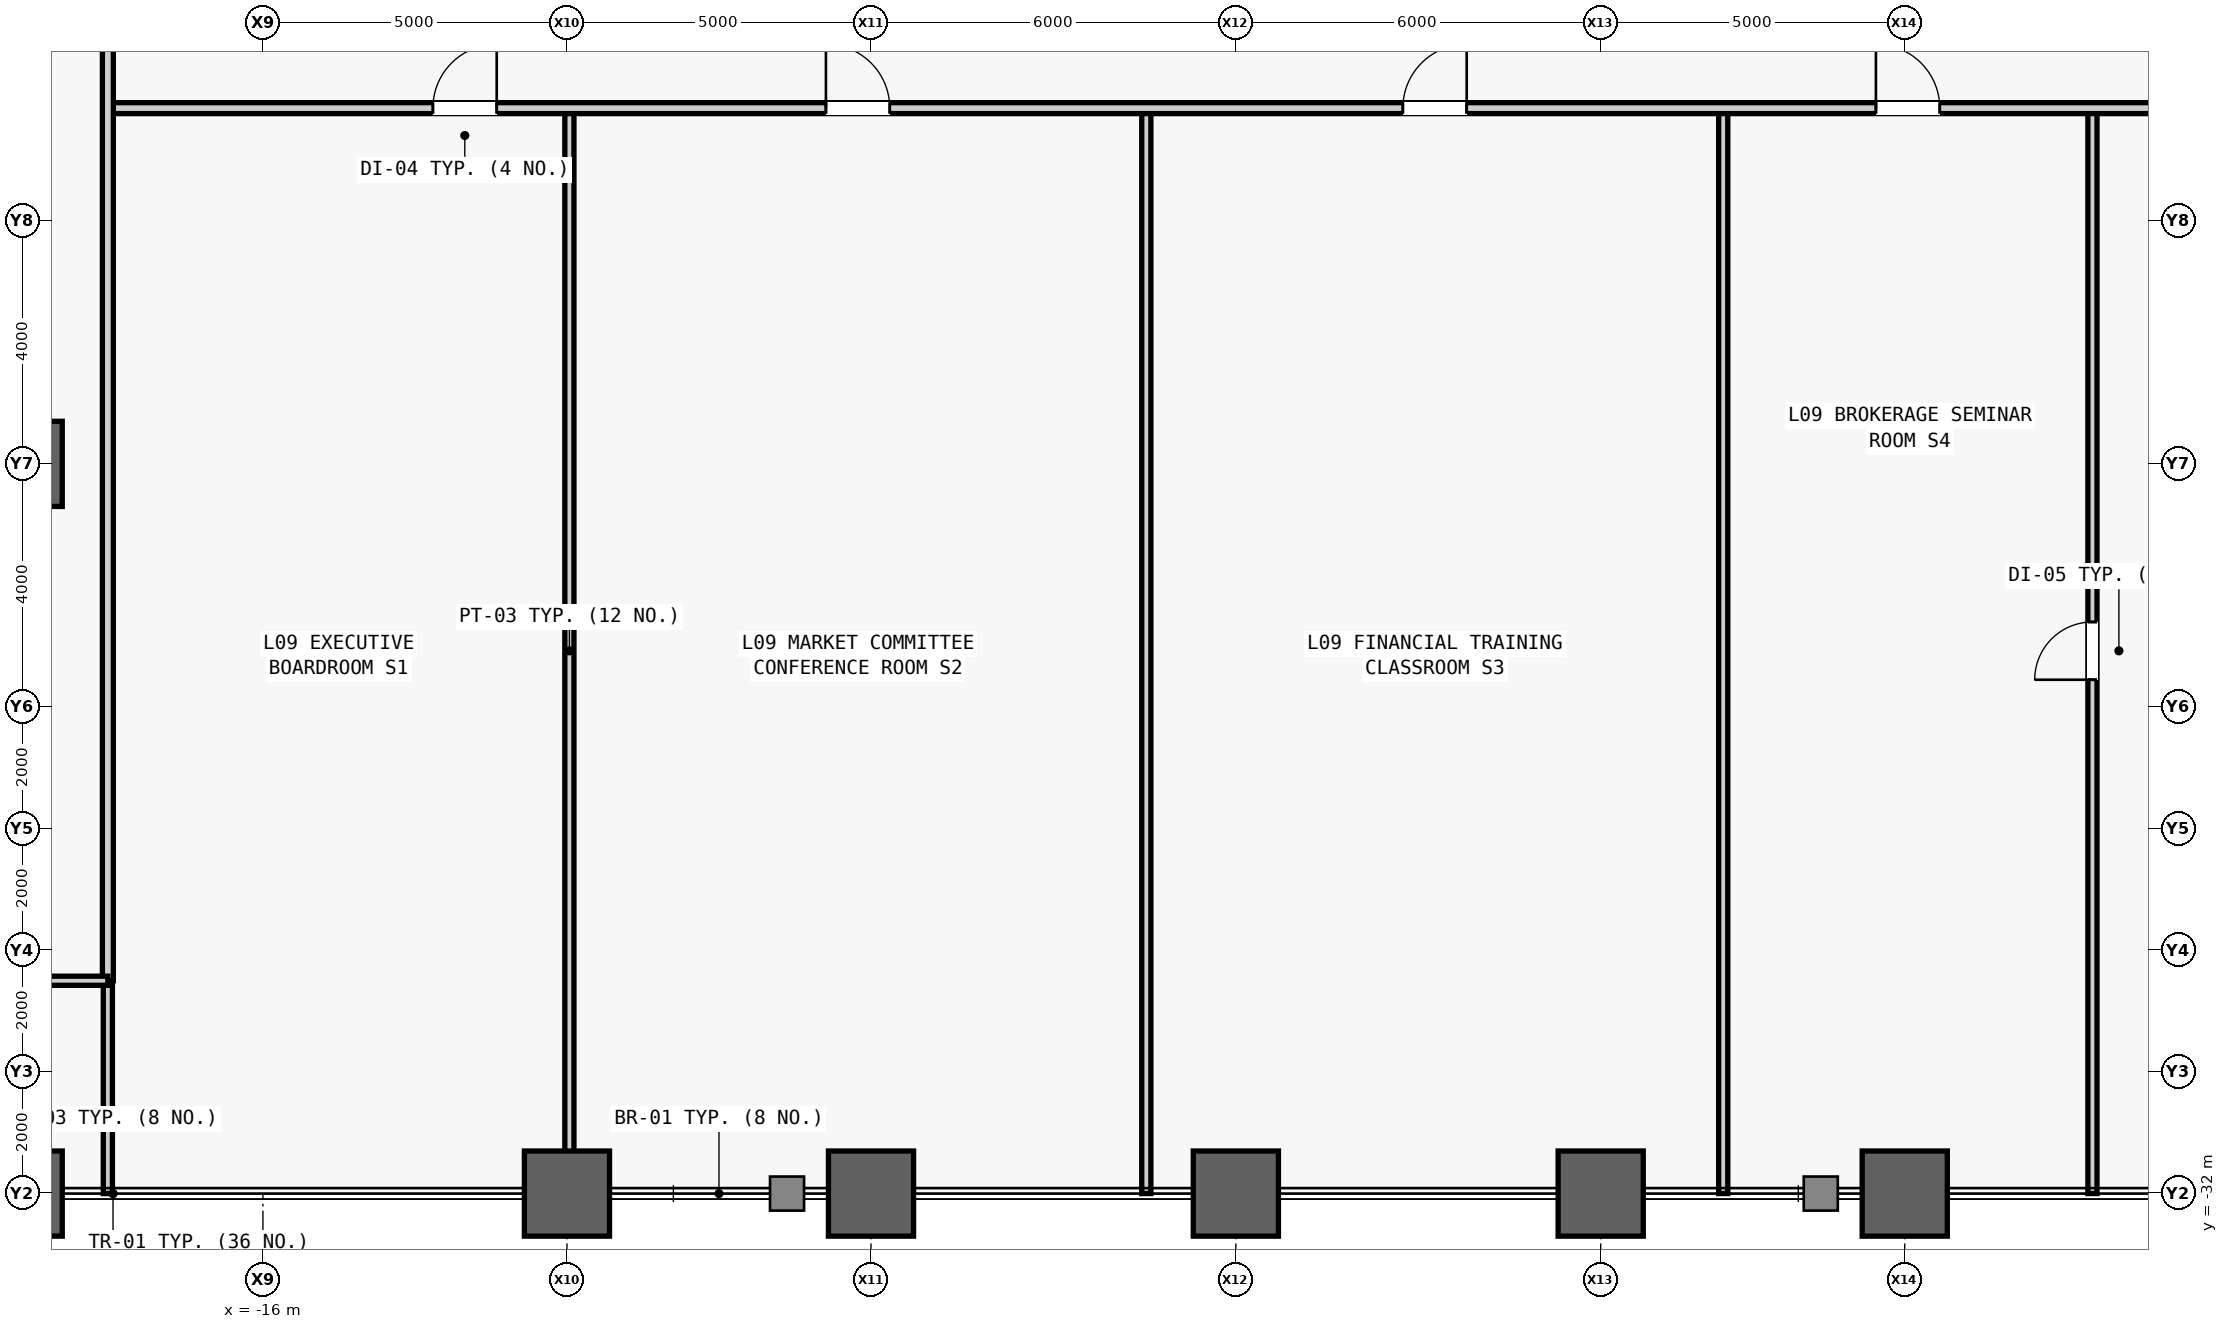
"""IFC4 building model, lengths in metres.
Left out: names, types, materials, properties, quantities, classifications, styles, units other than length and angle.
Written with IfcOpenShell. Run it as: python <this file> out.ifc"""

import sys

from ifc_helpers import new_model, si_unit, direction, frame, frame_2d, origin, origin_2d, place, context, subcontext, project, spatial, rectangle, hollow_rectangle, extrude, source, transform, mapped, element, fill, save


model = new_model("IFC4")
c1 = context("Model", 3, precision=1e-05, world=origin(), true_north=direction((0.0, 1.0)))
c2 = subcontext(c1, "Body", "Model", "MODEL_VIEW")
j1 = project(units=[si_unit("LENGTHUNIT", "METRE"), si_unit("PLANEANGLEUNIT", "RADIAN")], contexts=[c1])
p1 = place(None, origin())
s1 = spatial("IfcSite", under=j1, at=p1, CompositionType="ELEMENT")
p2 = place(p1, origin())
s2 = spatial("IfcBuilding", under=s1, at=p2, CompositionType="ELEMENT")
p3 = place(p2, frame((0.0, 0.0, 45.2)))
s3 = spatial("IfcBuildingStorey", under=s2, at=p3, CompositionType="ELEMENT", Elevation=45.2)
m1 = source(origin(), c2, "Body", "SweptSolid", [
    extrude(hollow_rectangle(XDim=1.4, YDim=1.4, WallThickness=0.075, at=origin_2d()), origin(), (0.0, 0.0, 1.0), 4.2),
])
for number, where, z_axis, x_axis in (
    (1, (-20.0, -32.0, 0.0), (0.0, 0.0, 1.0), (1.0, 0.0, 0.0)),
    (2, (-20.0, -20.0, 0.0), (0.0, 0.0, 1.0), (1.0, 0.0, 0.0)),
    (3, (-11.0, -32.0, 0.0), (0.0, 0.0, 1.0), (1.0, 0.0, 0.0)),
    (4, (-6.0, -32.0, 0.0), (0.0, 0.0, 1.0), (1.0, 0.0, 0.0)),
    (5, (0.0, -32.0, 0.0), (0.0, 0.0, 1.0), (1.0, 0.0, 0.0)),
    (6, (6.0, -32.0, 0.0), (0.0, 0.0, 1.0), (1.0, 0.0, 0.0)),
    (7, (11.0, -32.0, 0.0), (0.0, 0.0, 1.0), (1.0, 0.0, 0.0)),
):
    element("IfcColumn", number, at=place(p3, frame(where, z_axis=z_axis, x_axis=x_axis)), inside=s3, PredefinedType="COLUMN", context=c2, shape_type="MappedRepresentation", body=[
        mapped(m1, transform((0.0, 0.0, 0.0), scale=1.0)),
    ])
m2 = source(origin(), c2, "Body", "SweptSolid", [
    extrude(rectangle(XDim=17.85, YDim=0.15, at=frame_2d((8.925, 0.0))), origin(), (0.0, 0.0, 1.0), 3.085),
])
p4 = place(p3, frame((-10.96, -32.0, 0.0), z_axis=(0.0, 0.0, 1.0), x_axis=(0.0, 1.0, 0.0)))
e8 = element("IfcWall", 8, at=p4, inside=s3, PredefinedType="PARTITIONING", context=c2, shape_type="MappedRepresentation", body=[
    mapped(m2, transform((0.0, 0.0, 0.0), scale=1.0)),
])
m3 = source(origin(), c2, "Body", "SweptSolid", [
    extrude(rectangle(XDim=17.85, YDim=0.15, at=frame_2d((8.925, 0.0))), origin(), (0.0, 0.0, 1.0), 3.94),
])
for number, where, z_axis, x_axis in (
    (9, (-1.472, -32.0, 0.0), (0.0, 0.0, 1.0), (0.0, 1.0, 0.0)),
    (10, (8.015, -32.0, 0.0), (0.0, 0.0, 1.0), (0.0, 1.0, 0.0)),
):
    element("IfcWall", number, at=place(p3, frame(where, z_axis=z_axis, x_axis=x_axis)), inside=s3, PredefinedType="PARTITIONING", context=c2, shape_type="MappedRepresentation", body=[
        mapped(m3, transform((0.0, 0.0, 0.0), scale=1.0)),
    ])
p5 = place(p3, frame((14.087, -32.0, 0.0), z_axis=(0.0, 0.0, 1.0), x_axis=(0.0, 1.0, 0.0)))
e11 = element("IfcWall", 11, at=p5, inside=s3, PredefinedType="PARTITIONING", context=c2, shape_type="MappedRepresentation", body=[
    mapped(m3, transform((0.0, 0.0, 0.0), scale=1.0)),
])
m4 = source(origin(), c2, "Body", "SweptSolid", [
    extrude(rectangle(XDim=0.95, YDim=2.15, at=frame_2d((0.475, 1.075))), frame((0.0, 0.085, 0.0), z_axis=(0.0, -1.0, 0.0), x_axis=(1.0, 0.0, 0.0)), (0.0, 0.0, 1.0), 0.17),
])
p6 = place(p5, frame((8.45, 0.0, 0.0)))
e12 = element("IfcOpeningElement", 12, at=p6, cuts=e11, PredefinedType="OPENING", context=c2, shape_type="MappedRepresentation", body=[
    mapped(m4, transform((0.0, 0.0, 0.0), scale=1.0)),
])
m5 = source(origin(), c2, "Body", "SweptSolid", [
    extrude(rectangle(XDim=37.95, YDim=0.18, at=frame_2d((18.975, 0.0))), origin(), (0.0, 0.0, 1.0), 3.94),
])
p7 = place(p3, frame((-18.55, -14.15, 0.0), z_axis=(0.0, 0.0, 1.0), x_axis=(1.0, 0.0, 0.0)))
e13 = element("IfcWall", 13, at=p7, inside=s3, PredefinedType="PARTITIONING", context=c2, shape_type="MappedRepresentation", body=[
    mapped(m5, transform((0.0, 0.0, 0.0), scale=1.0)),
])
m6 = source(origin(), c2, "Body", "SweptSolid", [
    extrude(rectangle(XDim=1.05, YDim=2.2, at=frame_2d((0.525, 1.1))), frame((0.0, 0.1, 0.0), z_axis=(0.0, -1.0, 0.0), x_axis=(1.0, 0.0, 0.0)), (0.0, 0.0, 1.0), 0.2),
])
p8 = place(p7, frame((5.345, 0.0, 0.0)))
e14 = element("IfcOpeningElement", 14, at=p8, cuts=e13, PredefinedType="OPENING", context=c2, shape_type="MappedRepresentation", body=[
    mapped(m6, transform((0.0, 0.0, 0.0), scale=1.0)),
])
p9 = place(p7, frame((11.809, 0.0, 0.0)))
e15 = element("IfcOpeningElement", 15, at=p9, cuts=e13, PredefinedType="OPENING", context=c2, shape_type="MappedRepresentation", body=[
    mapped(m6, transform((0.0, 0.0, 0.0), scale=1.0)),
])
p10 = place(p7, frame((21.296, 0.0, 0.0)))
e16 = element("IfcOpeningElement", 16, at=p10, cuts=e13, PredefinedType="OPENING", context=c2, shape_type="MappedRepresentation", body=[
    mapped(m6, transform((0.0, 0.0, 0.0), scale=1.0)),
])
p11 = place(p7, frame((29.076, 0.0, 0.0)))
e17 = element("IfcOpeningElement", 17, at=p11, cuts=e13, PredefinedType="OPENING", context=c2, shape_type="MappedRepresentation", body=[
    mapped(m6, transform((0.0, 0.0, 0.0), scale=1.0)),
])
m7 = source(origin(), c2, "Body", "SweptSolid", [
    extrude(rectangle(XDim=3.5, YDim=0.15, at=frame_2d((1.75, 0.0))), origin(), (0.0, 0.0, 1.0), 3.94),
])
p12 = place(p3, frame((-18.55, -32.0, 0.0), z_axis=(0.0, 0.0, 1.0), x_axis=(0.0, 1.0, 0.0)))
e18 = element("IfcWall", 18, at=p12, inside=s3, PredefinedType="PARTITIONING", context=c2, shape_type="MappedRepresentation", body=[
    mapped(m7, transform((0.0, 0.0, 0.0), scale=1.0)),
])
m8 = source(origin(), c2, "Body", "SweptSolid", [
    extrude(rectangle(XDim=57.0, YDim=0.18, at=frame_2d((28.5, 0.0))), origin(), (0.0, 0.0, 1.0), 3.94),
])
p13 = place(p3, frame((-18.55, -28.5, 0.0), z_axis=(0.0, 0.0, 1.0), x_axis=(0.0, 1.0, 0.0)))
e19 = element("IfcWall", 19, at=p13, inside=s3, PredefinedType="PARTITIONING", context=c2, shape_type="MappedRepresentation", body=[
    mapped(m8, transform((0.0, 0.0, 0.0), scale=1.0)),
])
m9 = source(origin(), c2, "Body", "SweptSolid", [
    extrude(rectangle(XDim=0.95, YDim=2.15, at=frame_2d((0.475, 1.075))), frame((0.0, 0.1, 0.0), z_axis=(0.0, -1.0, 0.0), x_axis=(1.0, 0.0, 0.0)), (0.0, 0.0, 1.0), 0.2),
])
p14 = place(p13, frame((18.615, 0.0, 0.0)))
e20 = element("IfcOpeningElement", 20, at=p14, cuts=e19, PredefinedType="OPENING", context=c2, shape_type="MappedRepresentation", body=[
    mapped(m9, transform((0.0, 0.0, 0.0), scale=1.0)),
])
p15 = place(p13, frame((27.472, 0.0, 0.0)))
e21 = element("IfcOpeningElement", 21, at=p15, cuts=e19, PredefinedType="OPENING", context=c2, shape_type="MappedRepresentation", body=[
    mapped(m9, transform((0.0, 0.0, 0.0), scale=1.0)),
])
p16 = place(p13, frame((36.607, 0.0, 0.0)))
e22 = element("IfcOpeningElement", 22, at=p16, cuts=e19, PredefinedType="OPENING", context=c2, shape_type="MappedRepresentation", body=[
    mapped(m9, transform((0.0, 0.0, 0.0), scale=1.0)),
])
m10 = source(origin(), c2, "Body", "SweptSolid", [
    extrude(rectangle(XDim=9.95, YDim=0.15, at=frame_2d((4.975, 0.0))), origin(), (0.0, 0.0, 1.0), 3.94),
])
p17 = place(p3, frame((-28.5, -28.5, 0.0), z_axis=(0.0, 0.0, 1.0), x_axis=(1.0, 0.0, 0.0)))
e23 = element("IfcWall", 23, at=p17, inside=s3, PredefinedType="PARTITIONING", context=c2, shape_type="MappedRepresentation", body=[
    mapped(m10, transform((0.0, 0.0, 0.0), scale=1.0)),
])
p18 = place(p17, frame((4.5, 0.0, 0.0)))
e24 = element("IfcOpeningElement", 24, at=p18, cuts=e23, PredefinedType="OPENING", context=c2, shape_type="MappedRepresentation", body=[
    mapped(m4, transform((0.0, 0.0, 0.0), scale=1.0)),
])
m11 = source(origin(), c2, "Body", "SweptSolid", [
    extrude(rectangle(XDim=0.95, YDim=2.15, at=frame_2d((0.475, 1.075))), frame((0.0, 0.025, 0.0), z_axis=(0.0, -1.0, 0.0), x_axis=(1.0, 0.0, 0.0)), (0.0, 0.0, 1.0), 0.05),
])
p19 = place(p6, origin())
e25 = element("IfcDoor", 25, at=p19, inside=s3, OperationType="SINGLE_SWING_LEFT", PredefinedType="DOOR", context=c2, shape_type="MappedRepresentation", body=[
    mapped(m11, transform((0.0, 0.0, 0.0), scale=1.0)),
])
fill(e12, e25)
m12 = source(origin(), c2, "Body", "SweptSolid", [
    extrude(rectangle(XDim=1.05, YDim=2.2, at=frame_2d((0.525, 1.1))), frame((0.0, 0.025, 0.0), z_axis=(0.0, -1.0, 0.0), x_axis=(1.0, 0.0, 0.0)), (0.0, 0.0, 1.0), 0.05),
])
p20 = place(p8, origin())
e26 = element("IfcDoor", 26, at=p20, inside=s3, OperationType="SINGLE_SWING_RIGHT", PredefinedType="DOOR", context=c2, shape_type="MappedRepresentation", body=[
    mapped(m12, transform((0.0, 0.0, 0.0), scale=1.0)),
])
fill(e14, e26)
p21 = place(p9, origin())
e27 = element("IfcDoor", 27, at=p21, inside=s3, OperationType="SINGLE_SWING_LEFT", PredefinedType="DOOR", context=c2, shape_type="MappedRepresentation", body=[
    mapped(m12, transform((0.0, 0.0, 0.0), scale=1.0)),
])
fill(e15, e27)
p22 = place(p10, origin())
e28 = element("IfcDoor", 28, at=p22, inside=s3, OperationType="SINGLE_SWING_RIGHT", PredefinedType="DOOR", context=c2, shape_type="MappedRepresentation", body=[
    mapped(m12, transform((0.0, 0.0, 0.0), scale=1.0)),
])
fill(e16, e28)
p23 = place(p11, origin())
e29 = element("IfcDoor", 29, at=p23, inside=s3, OperationType="SINGLE_SWING_LEFT", PredefinedType="DOOR", context=c2, shape_type="MappedRepresentation", body=[
    mapped(m12, transform((0.0, 0.0, 0.0), scale=1.0)),
])
fill(e17, e29)
save(model, sys.argv[1])
